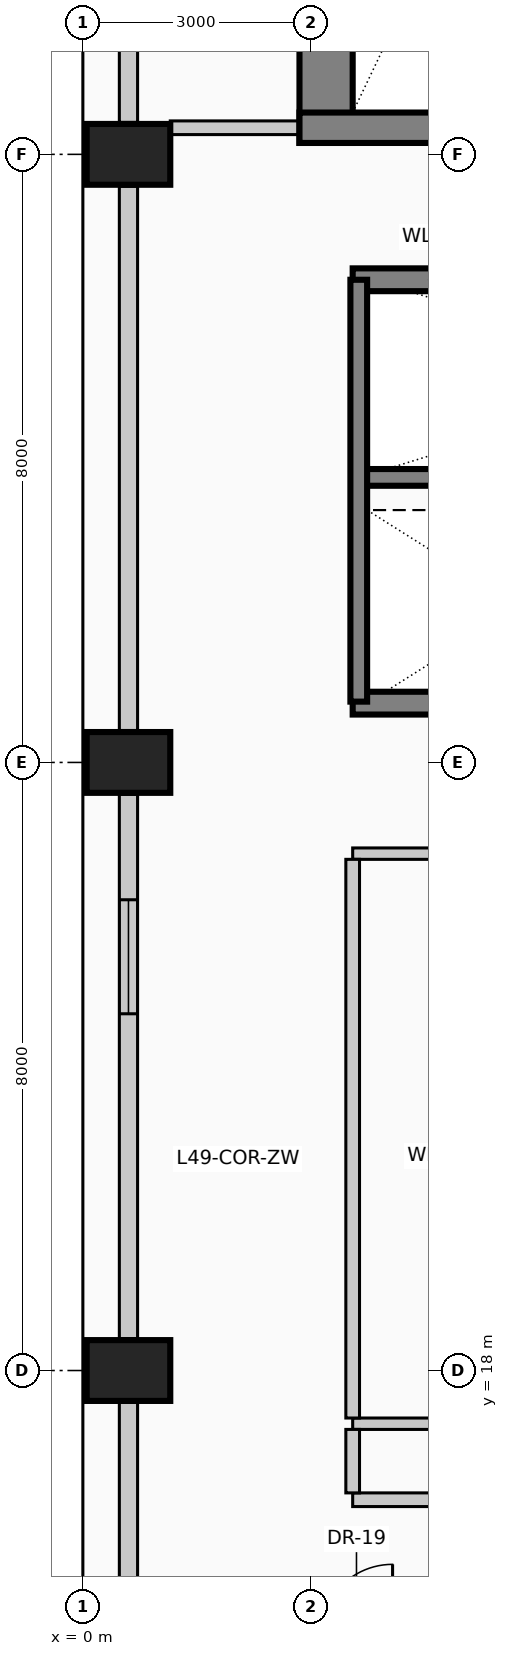
"""IFC4 building model, lengths in metres.
Left out: names, types, materials, properties, quantities, classifications, styles, units other than length and angle.
Written with IfcOpenShell. Run it as: python <this file> out.ifc"""

import sys

from ifc_helpers import new_model, si_unit, direction, frame, frame_2d, origin, origin_2d, place, context, subcontext, project, spatial, rectangle, extrude, element, fill, save


model = new_model("IFC4")
c1 = context("Model", 3, precision=1e-05, world=origin(), true_north=direction((0.0, 1.0)))
c2 = subcontext(c1, "Body", "Model", "MODEL_VIEW")
j1 = project(units=[si_unit("LENGTHUNIT", "METRE"), si_unit("PLANEANGLEUNIT", "RADIAN")], contexts=[c1])
p1 = place(None, origin())
s1 = spatial("IfcSite", under=j1, at=p1, CompositionType="ELEMENT")
p2 = place(p1, origin())
s2 = spatial("IfcBuilding", under=s1, at=p2, CompositionType="ELEMENT")
p3 = place(p2, frame((0.0, 0.0, 202.6)))
s3 = spatial("IfcBuildingStorey", under=s2, at=p3, CompositionType="ELEMENT", Elevation=202.6)
p4 = place(p3, frame((3.2, 34.15, 0.0), z_axis=(0.0, 0.0, 1.0), x_axis=(0.0, 1.0, 0.0)))
e1 = element("IfcWall", 1, at=p4, inside=s3, PredefinedType="SHEAR", context=c2, shape_type="SweptSolid", body=[
    extrude(rectangle(XDim=8.98, YDim=0.7, at=frame_2d((4.49, 0.0))), origin(), (0.0, 0.0, 1.0), 4.0),
])
p5 = place(p3, frame((2.85, 34.35, 0.0), z_axis=(0.0, 0.0, 1.0), x_axis=(1.0, 0.0, 0.0)))
e2 = element("IfcWall", 2, at=p5, inside=s3, PredefinedType="SHEAR", context=c2, shape_type="SweptSolid", body=[
    extrude(rectangle(XDim=4.86, YDim=0.4, at=frame_2d((2.43, 0.0))), origin(), (0.0, 0.0, 1.0), 4.0),
])
p6 = place(p5, frame((2.4, 0.0, 0.0)))
e3 = element("IfcOpeningElement", 3, at=p6, cuts=e2, PredefinedType="OPENING", context=c2, shape_type="SweptSolid", body=[
    extrude(rectangle(XDim=1.15, YDim=2.2, at=frame_2d((0.575, 1.1))), frame((0.0, 0.21, 0.0), z_axis=(0.0, -1.0, 0.0), x_axis=(1.0, 0.0, 0.0)), (0.0, 0.0, 1.0), 0.42),
])
for number, where, z_axis, x_axis in (
    (4, (0.6, 18.0, 0.0), (0.0, 0.0, 1.0), (0.0, 1.0, 0.0)),
    (5, (0.6, 26.0, 0.0), (0.0, 0.0, 1.0), (0.0, 1.0, 0.0)),
    (6, (0.6, 34.0, 0.0), (0.0, 0.0, 1.0), (0.0, 1.0, 0.0)),
):
    element("IfcColumn", number, at=place(p3, frame(where, z_axis=z_axis, x_axis=x_axis)), inside=s3, PredefinedType="COLUMN", context=c2, shape_type="SweptSolid", body=[
        extrude(rectangle(XDim=0.8, YDim=1.1, at=origin_2d()), origin(), (0.0, 0.0, 1.0), 4.0),
    ])
p7 = place(p3, frame((0.6, 10.42, 0.0), z_axis=(0.0, 0.0, 1.0), x_axis=(0.0, 1.0, 0.0)))
e7 = element("IfcWall", 7, at=p7, inside=s3, PredefinedType="SOLIDWALL", context=c2, shape_type="SweptSolid", body=[
    extrude(rectangle(XDim=7.16, YDim=0.24, at=frame_2d((3.58, 0.0))), origin(), (0.0, 0.0, 1.0), 3.0),
])
p8 = place(p7, frame((1.387, 0.0, 0.42)))
e8 = element("IfcOpeningElement", 8, at=p8, cuts=e7, PredefinedType="OPENING", context=c2, shape_type="SweptSolid", body=[
    extrude(rectangle(XDim=1.5, YDim=2.2, at=frame_2d((0.75, 1.1))), frame((0.0, 0.13, 0.0), z_axis=(0.0, -1.0, 0.0), x_axis=(1.0, 0.0, 0.0)), (0.0, 0.0, 1.0), 0.26),
])
p9 = place(p3, frame((0.6, 18.42, 0.0), z_axis=(0.0, 0.0, 1.0), x_axis=(0.0, 1.0, 0.0)))
e9 = element("IfcWall", 9, at=p9, inside=s3, PredefinedType="SOLIDWALL", context=c2, shape_type="SweptSolid", body=[
    extrude(rectangle(XDim=7.16, YDim=0.24, at=frame_2d((3.58, 0.0))), origin(), (0.0, 0.0, 1.0), 3.0),
])
p10 = place(p9, frame((4.273, 0.0, 0.42)))
e10 = element("IfcOpeningElement", 10, at=p10, cuts=e9, PredefinedType="OPENING", context=c2, shape_type="SweptSolid", body=[
    extrude(rectangle(XDim=1.5, YDim=2.2, at=frame_2d((0.75, 1.1))), frame((0.0, 0.13, 0.0), z_axis=(0.0, -1.0, 0.0), x_axis=(1.0, 0.0, 0.0)), (0.0, 0.0, 1.0), 0.26),
])
p11 = place(p3, frame((0.6, 26.42, 0.0), z_axis=(0.0, 0.0, 1.0), x_axis=(0.0, 1.0, 0.0)))
e11 = element("IfcWall", 11, at=p11, inside=s3, PredefinedType="SOLIDWALL", context=c2, shape_type="SweptSolid", body=[
    extrude(rectangle(XDim=7.16, YDim=0.24, at=frame_2d((3.58, 0.0))), origin(), (0.0, 0.0, 1.0), 3.0),
])
p12 = place(p3, frame((0.6, 34.42, 0.0), z_axis=(0.0, 0.0, 1.0), x_axis=(0.0, 1.0, 0.0)))
e12 = element("IfcWall", 12, at=p12, inside=s3, PredefinedType="SOLIDWALL", context=c2, shape_type="SweptSolid", body=[
    extrude(rectangle(XDim=7.56, YDim=0.24, at=frame_2d((3.78, 0.0))), origin(), (0.0, 0.0, 1.0), 3.0),
])
for number, where, z_axis, x_axis in (
    (13, (3.55, 32.35, 0.0), (0.0, 0.0, 1.0), (1.0, 0.0, 0.0)),
    (14, (5.65, 26.78, 0.0), (0.0, 0.0, 1.0), (-1.0, 0.0, 0.0)),
):
    element("IfcWall", number, at=place(p3, frame(where, z_axis=z_axis, x_axis=x_axis)), inside=s3, PredefinedType="SOLIDWALL", context=c2, shape_type="SweptSolid", body=[
        extrude(rectangle(XDim=2.1, YDim=0.3, at=frame_2d((1.05, 0.0))), origin(), (0.0, 0.0, 1.0), 4.0),
    ])
p13 = place(p3, frame((3.55, 29.75, 0.0), z_axis=(0.0, 0.0, 1.0), x_axis=(1.0, 0.0, 0.0)))
e15 = element("IfcWall", 15, at=p13, inside=s3, PredefinedType="SOLIDWALL", context=c2, shape_type="SweptSolid", body=[
    extrude(rectangle(XDim=8.65, YDim=0.22, at=frame_2d((4.325, 0.0))), origin(), (0.0, 0.0, 1.0), 4.0),
])
p14 = place(p3, frame((3.63, 26.8, 0.0), z_axis=(0.0, 0.0, 1.0), x_axis=(0.0, 1.0, 0.0)))
e16 = element("IfcWall", 16, at=p14, inside=s3, PredefinedType="SOLIDWALL", context=c2, shape_type="SweptSolid", body=[
    extrude(rectangle(XDim=5.55, YDim=0.22, at=frame_2d((2.775, 0.0))), origin(), (0.0, 0.0, 1.0), 4.0),
])
p15 = place(p3, frame((3.55, 16.3, 0.0), z_axis=(0.0, 0.0, 1.0), x_axis=(1.0, 0.0, 0.0)))
e17 = element("IfcWall", 17, at=p15, inside=s3, PredefinedType="PARTITIONING", context=c2, shape_type="SweptSolid", body=[
    extrude(rectangle(XDim=12.3, YDim=0.18, at=frame_2d((6.15, 0.0))), origin(), (0.0, 0.0, 1.0), 3.75),
])
p16 = place(p3, frame((3.55, 17.3, 0.0), z_axis=(0.0, 0.0, 1.0), x_axis=(1.0, 0.0, 0.0)))
e18 = element("IfcWall", 18, at=p16, inside=s3, PredefinedType="PARTITIONING", context=c2, shape_type="SweptSolid", body=[
    extrude(rectangle(XDim=6.25, YDim=0.15, at=frame_2d((3.125, 0.0))), origin(), (0.0, 0.0, 1.0), 3.75),
])
p17 = place(p3, frame((3.55, 24.8, 0.0), z_axis=(0.0, 0.0, 1.0), x_axis=(1.0, 0.0, 0.0)))
e19 = element("IfcWall", 19, at=p17, inside=s3, PredefinedType="PARTITIONING", context=c2, shape_type="SweptSolid", body=[
    extrude(rectangle(XDim=6.25, YDim=0.15, at=frame_2d((3.125, 0.0))), origin(), (0.0, 0.0, 1.0), 3.75),
])
p18 = place(p17, frame((2.65, 0.0, 0.0)))
e20 = element("IfcOpeningElement", 20, at=p18, cuts=e19, PredefinedType="OPENING", context=c2, shape_type="SweptSolid", body=[
    extrude(rectangle(XDim=0.95, YDim=2.15, at=frame_2d((0.475, 1.075))), frame((0.0, 0.085, 0.0), z_axis=(0.0, -1.0, 0.0), x_axis=(1.0, 0.0, 0.0)), (0.0, 0.0, 1.0), 0.17),
])
p19 = place(p3, frame((1.15, 34.35, 0.0), z_axis=(0.0, 0.0, 1.0), x_axis=(1.0, 0.0, 0.0)))
e21 = element("IfcWall", 21, at=p19, inside=s3, PredefinedType="PARTITIONING", context=c2, shape_type="SweptSolid", body=[
    extrude(rectangle(XDim=1.7, YDim=0.18, at=frame_2d((0.85, 0.0))), origin(), (0.0, 0.0, 1.0), 3.75),
])
p20 = place(p3, frame((3.55, 16.39, 0.0), z_axis=(0.0, 0.0, 1.0), x_axis=(0.0, 1.0, 0.0)))
e22 = element("IfcWall", 22, at=p20, inside=s3, PredefinedType="PARTITIONING", context=c2, shape_type="SweptSolid", body=[
    extrude(rectangle(XDim=0.835, YDim=0.18, at=frame_2d((0.417, 0.0))), origin(), (0.0, 0.0, 1.0), 3.75),
])
p21 = place(p3, frame((3.55, 17.375, 0.0), z_axis=(0.0, 0.0, 1.0), x_axis=(0.0, 1.0, 0.0)))
e23 = element("IfcWall", 23, at=p21, inside=s3, PredefinedType="PARTITIONING", context=c2, shape_type="SweptSolid", body=[
    extrude(rectangle(XDim=7.35, YDim=0.18, at=frame_2d((3.675, 0.0))), origin(), (0.0, 0.0, 1.0), 3.75),
])
p22 = place(p10, origin())
e24 = element("IfcWindow", 24, at=p22, inside=s3, PartitioningType="SINGLE_PANEL", PredefinedType="WINDOW", context=c2, shape_type="SweptSolid", body=[
    extrude(rectangle(XDim=1.5, YDim=2.2, at=frame_2d((0.75, 1.1))), frame((0.0, 0.03, 0.0), z_axis=(0.0, -1.0, 0.0), x_axis=(1.0, 0.0, 0.0)), (0.0, 0.0, 1.0), 0.06),
])
fill(e10, e24)
save(model, sys.argv[1])
